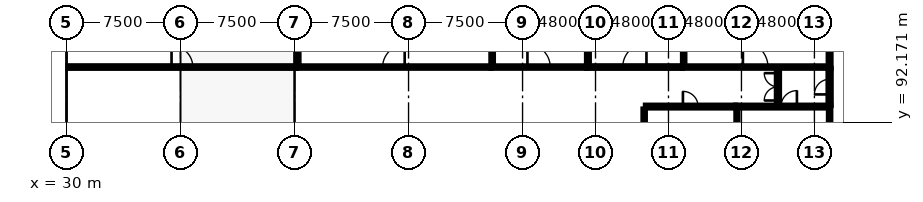
"""IFC4 building model, lengths in metres.
Left out: names, types, materials, properties, quantities, classifications, styles, units other than length and angle.
Written with IfcOpenShell. Run it as: python <this file> out.ifc"""

import sys

from ifc_helpers import new_model, si_unit, direction, frame, frame_2d, origin, place, context, subcontext, project, spatial, rectangle, extrude, element, fill, save


model = new_model("IFC4")
c1 = context("Model", 3, precision=1e-05, world=origin(), true_north=direction((0.0, 1.0)))
c2 = subcontext(c1, "Body", "Model", "MODEL_VIEW")
j1 = project(units=[si_unit("LENGTHUNIT", "METRE"), si_unit("PLANEANGLEUNIT", "RADIAN")], contexts=[c1])
p1 = place(None, origin())
s1 = spatial("IfcSite", under=j1, at=p1, CompositionType="ELEMENT")
p2 = place(p1, origin())
s2 = spatial("IfcBuilding", under=s1, at=p2, CompositionType="ELEMENT")
p3 = place(p2, origin())
s3 = spatial("IfcBuildingStorey", under=s2, at=p3, CompositionType="ELEMENT", Elevation=0.0)
p4 = place(p3, frame((76.8, 93.285, 0.0), z_axis=(0.0, 0.0, 1.0), x_axis=(0.0, 1.0, 0.0)))
e1 = element("IfcWall", 1, at=p4, inside=s3, PredefinedType="PARTITIONING", context=c2, shape_type="SweptSolid", body=[
    extrude(rectangle(XDim=2.43, YDim=0.2, at=frame_2d((1.215, 0.0))), origin(), (0.0, 0.0, 1.0), 4.7),
])
p5 = place(p4, frame((0.315, 0.0, 0.0)))
e2 = element("IfcOpeningElement", 2, at=p5, cuts=e1, PredefinedType="OPENING", context=c2, shape_type="SweptSolid", body=[
    extrude(rectangle(XDim=1.8, YDim=2.15, at=frame_2d((0.9, 1.075))), frame((0.0, 0.112, 0.0), z_axis=(0.0, -1.0, 0.0), x_axis=(1.0, 0.0, 0.0)), (0.0, 0.0, 1.0), 0.224),
])
p6 = place(p3, frame((30.102, 95.8, 0.0), z_axis=(0.0, 0.0, 1.0), x_axis=(1.0, 0.0, 0.0)))
e3 = element("IfcWall", 3, at=p6, inside=s3, PredefinedType="PARTITIONING", context=c2, shape_type="SweptSolid", body=[
    extrude(rectangle(XDim=15.013, YDim=0.16, at=frame_2d((7.506, 0.0))), origin(), (0.0, 0.0, 1.0), 4.035),
])
p7 = place(p6, frame((6.806, 0.0, 0.0)))
e4 = element("IfcOpeningElement", 4, at=p7, cuts=e3, PredefinedType="OPENING", context=c2, shape_type="SweptSolid", body=[
    extrude(rectangle(XDim=1.4, YDim=2.25, at=frame_2d((0.7, 1.125))), frame((0.0, 0.092, 0.0), z_axis=(0.0, -1.0, 0.0), x_axis=(1.0, 0.0, 0.0)), (0.0, 0.0, 1.0), 0.184),
])
p8 = place(p3, frame((45.127, 95.8, 0.0), z_axis=(0.0, 0.0, 1.0), x_axis=(1.0, 0.0, 0.0)))
e5 = element("IfcWall", 5, at=p8, inside=s3, PredefinedType="PARTITIONING", context=c2, shape_type="SweptSolid", body=[
    extrude(rectangle(XDim=12.788, YDim=0.15, at=frame_2d((6.394, 0.0))), origin(), (0.0, 0.0, 1.0), 3.985),
])
p9 = place(p8, frame((5.669, 0.0, 0.0)))
e6 = element("IfcOpeningElement", 6, at=p9, cuts=e5, PredefinedType="OPENING", context=c2, shape_type="SweptSolid", body=[
    extrude(rectangle(XDim=1.45, YDim=2.26, at=frame_2d((0.725, 1.13))), frame((0.0, 0.087, 0.0), z_axis=(0.0, -1.0, 0.0), x_axis=(1.0, 0.0, 0.0)), (0.0, 0.0, 1.0), 0.174),
])
p10 = place(p3, frame((57.927, 95.8, 0.0), z_axis=(0.0, 0.0, 1.0), x_axis=(1.0, 0.0, 0.0)))
e7 = element("IfcWall", 7, at=p10, inside=s3, PredefinedType="PARTITIONING", context=c2, shape_type="SweptSolid", body=[
    extrude(rectangle(XDim=6.288, YDim=0.15, at=frame_2d((3.144, 0.0))), origin(), (0.0, 0.0, 1.0), 3.985),
])
p11 = place(p10, frame((2.394, 0.0, 0.0)))
e8 = element("IfcOpeningElement", 8, at=p11, cuts=e7, PredefinedType="OPENING", context=c2, shape_type="SweptSolid", body=[
    extrude(rectangle(XDim=1.5, YDim=2.28, at=frame_2d((0.75, 1.14))), frame((0.0, 0.087, 0.0), z_axis=(0.0, -1.0, 0.0), x_axis=(1.0, 0.0, 0.0)), (0.0, 0.0, 1.0), 0.174),
])
p12 = place(p3, frame((64.227, 95.8, 0.0), z_axis=(0.0, 0.0, 1.0), x_axis=(1.0, 0.0, 0.0)))
e9 = element("IfcWall", 9, at=p12, inside=s3, PredefinedType="PARTITIONING", context=c2, shape_type="SweptSolid", body=[
    extrude(rectangle(XDim=6.288, YDim=0.16, at=frame_2d((3.144, 0.0))), origin(), (0.0, 0.0, 1.0), 3.985),
])
p13 = place(p12, frame((2.364, 0.0, 0.0)))
e10 = element("IfcOpeningElement", 10, at=p13, cuts=e9, PredefinedType="OPENING", context=c2, shape_type="SweptSolid", body=[
    extrude(rectangle(XDim=1.56, YDim=2.3, at=frame_2d((0.78, 1.15))), frame((0.0, 0.092, 0.0), z_axis=(0.0, -1.0, 0.0), x_axis=(1.0, 0.0, 0.0)), (0.0, 0.0, 1.0), 0.184),
])
p14 = place(p3, frame((70.527, 95.8, 0.0), z_axis=(0.0, 0.0, 1.0), x_axis=(1.0, 0.0, 0.0)))
e11 = element("IfcWall", 11, at=p14, inside=s3, PredefinedType="PARTITIONING", context=c2, shape_type="SweptSolid", body=[
    extrude(rectangle(XDim=9.588, YDim=0.15, at=frame_2d((4.794, 0.0))), origin(), (0.0, 0.0, 1.0), 3.985),
])
p15 = place(p14, frame((3.969, 0.0, 0.0)))
e12 = element("IfcOpeningElement", 12, at=p15, cuts=e11, PredefinedType="OPENING", context=c2, shape_type="SweptSolid", body=[
    extrude(rectangle(XDim=1.65, YDim=2.32, at=frame_2d((0.825, 1.16))), frame((0.0, 0.087, 0.0), z_axis=(0.0, -1.0, 0.0), x_axis=(1.0, 0.0, 0.0)), (0.0, 0.0, 1.0), 0.174),
])
p16 = place(p3, frame((68.085, 93.2, 0.0), z_axis=(0.0, 0.0, 1.0), x_axis=(1.0, 0.0, 0.0)))
e13 = element("IfcWall", 13, at=p16, inside=s3, PredefinedType="PARTITIONING", context=c2, shape_type="SweptSolid", body=[
    extrude(rectangle(XDim=5.93, YDim=0.18, at=frame_2d((2.965, 0.0))), origin(), (0.0, 0.0, 1.0), 3.985),
])
p17 = place(p16, frame((2.465, 0.0, 0.0)))
e14 = element("IfcOpeningElement", 14, at=p17, cuts=e13, PredefinedType="OPENING", context=c2, shape_type="SweptSolid", body=[
    extrude(rectangle(XDim=1.0, YDim=2.15, at=frame_2d((0.5, 1.075))), frame((0.0, 0.102, 0.0), z_axis=(0.0, -1.0, 0.0), x_axis=(1.0, 0.0, 0.0)), (0.0, 0.0, 1.0), 0.204),
])
p18 = place(p3, frame((74.027, 93.2, 0.0), z_axis=(0.0, 0.0, 1.0), x_axis=(1.0, 0.0, 0.0)))
e15 = element("IfcWall", 15, at=p18, inside=s3, PredefinedType="PARTITIONING", context=c2, shape_type="SweptSolid", body=[
    extrude(rectangle(XDim=6.088, YDim=0.18, at=frame_2d((3.044, 0.0))), origin(), (0.0, 0.0, 1.0), 3.985),
])
p19 = place(p18, frame((2.972, 0.0, 0.0)))
e16 = element("IfcOpeningElement", 16, at=p19, cuts=e15, PredefinedType="OPENING", context=c2, shape_type="SweptSolid", body=[
    extrude(rectangle(XDim=1.05, YDim=2.15, at=frame_2d((0.525, 1.075))), frame((0.0, 0.102, 0.0), z_axis=(0.0, -1.0, 0.0), x_axis=(1.0, 0.0, 0.0)), (0.0, 0.0, 1.0), 0.204),
])
p20 = place(p3, frame((80.2, 93.285, 0.0), z_axis=(0.0, 0.0, 1.0), x_axis=(0.0, 1.0, 0.0)))
e17 = element("IfcWall", 17, at=p20, inside=s3, PredefinedType="PARTITIONING", context=c2, shape_type="SweptSolid", body=[
    extrude(rectangle(XDim=2.43, YDim=0.2, at=frame_2d((1.215, 0.0))), origin(), (0.0, 0.0, 1.0), 4.7),
])
p21 = place(p20, frame((0.715, 0.0, 0.0)))
e18 = element("IfcOpeningElement", 18, at=p21, cuts=e17, PredefinedType="OPENING", context=c2, shape_type="SweptSolid", body=[
    extrude(rectangle(XDim=1.0, YDim=2.15, at=frame_2d((0.5, 1.075))), frame((0.0, 0.112, 0.0), z_axis=(0.0, -1.0, 0.0), x_axis=(1.0, 0.0, 0.0)), (0.0, 0.0, 1.0), 0.224),
])
p22 = place(p3, frame((45.2, 95.887, 0.0), z_axis=(0.0, 0.0, 1.0), x_axis=(0.0, 1.0, 0.0)))
e19 = element("IfcWall", 19, at=p22, inside=s3, PredefinedType="PARTITIONING", context=c2, shape_type="SweptSolid", body=[
    extrude(rectangle(XDim=17.126, YDim=0.18, at=frame_2d((8.563, 0.0))), origin(), (0.0, 0.0, 1.0), 3.985),
])
p23 = place(p3, frame((58.0, 95.887, 0.0), z_axis=(0.0, 0.0, 1.0), x_axis=(0.0, 1.0, 0.0)))
e20 = element("IfcWall", 20, at=p23, inside=s3, PredefinedType="PARTITIONING", context=c2, shape_type="SweptSolid", body=[
    extrude(rectangle(XDim=17.311, YDim=0.16, at=frame_2d((8.656, 0.0))), origin(), (0.0, 0.0, 1.0), 3.985),
])
p24 = place(p3, frame((64.3, 95.892, 0.0), z_axis=(0.0, 0.0, 1.0), x_axis=(0.0, 1.0, 0.0)))
e21 = element("IfcWall", 21, at=p24, inside=s3, PredefinedType="PARTITIONING", context=c2, shape_type="SweptSolid", body=[
    extrude(rectangle(XDim=17.206, YDim=0.18, at=frame_2d((8.603, 0.0))), origin(), (0.0, 0.0, 1.0), 4.035),
])
p25 = place(p3, frame((70.6, 95.887, 0.0), z_axis=(0.0, 0.0, 1.0), x_axis=(0.0, 1.0, 0.0)))
e22 = element("IfcWall", 22, at=p25, inside=s3, PredefinedType="PARTITIONING", context=c2, shape_type="SweptSolid", body=[
    extrude(rectangle(XDim=17.211, YDim=0.15, at=frame_2d((8.605, 0.0))), origin(), (0.0, 0.0, 1.0), 4.035),
])
p26 = place(p3, frame((80.2, 95.727, 0.0), z_axis=(0.0, 0.0, 1.0), x_axis=(0.0, 1.0, 0.0)))
e23 = element("IfcWall", 23, at=p26, inside=s3, PredefinedType="PARTITIONING", context=c2, shape_type="SweptSolid", body=[
    extrude(rectangle(XDim=17.371, YDim=0.18, at=frame_2d((8.686, 0.0))), origin(), (0.0, 0.0, 1.0), 4.035),
])
p27 = place(p3, frame((68.0, 83.665, 0.0), z_axis=(0.0, 0.0, 1.0), x_axis=(0.0, 1.0, 0.0)))
e24 = element("IfcWall", 24, at=p27, inside=s3, PredefinedType="PARTITIONING", context=c2, shape_type="SweptSolid", body=[
    extrude(rectangle(XDim=9.37, YDim=0.15, at=frame_2d((4.685, 0.0))), origin(), (0.0, 0.0, 1.0), 4.035),
])
p28 = place(p3, frame((74.1, 83.637, 0.0), z_axis=(0.0, 0.0, 1.0), x_axis=(0.0, 1.0, 0.0)))
e25 = element("IfcWall", 25, at=p28, inside=s3, PredefinedType="PARTITIONING", context=c2, shape_type="SweptSolid", body=[
    extrude(rectangle(XDim=9.461, YDim=0.125, at=frame_2d((4.73, 0.0))), origin(), (0.0, 0.0, 1.0), 3.985),
])
p29 = place(p3, frame((80.2, 83.665, 0.0), z_axis=(0.0, 0.0, 1.0), x_axis=(0.0, 1.0, 0.0)))
e26 = element("IfcWall", 26, at=p29, inside=s3, PredefinedType="PARTITIONING", context=c2, shape_type="SweptSolid", body=[
    extrude(rectangle(XDim=9.608, YDim=0.15, at=frame_2d((4.804, 0.0))), origin(), (0.0, 0.0, 1.0), 4.035),
])
p30 = place(p5, origin())
e27 = element("IfcDoor", 27, at=p30, inside=s3, OperationType="DOUBLE_DOOR_SINGLE_SWING", PredefinedType="DOOR", context=c2, shape_type="SweptSolid", body=[
    extrude(rectangle(XDim=1.8, YDim=2.15, at=frame_2d((0.9, 1.075))), frame((0.0, 0.025, 0.0), z_axis=(0.0, -1.0, 0.0), x_axis=(1.0, 0.0, 0.0)), (0.0, 0.0, 1.0), 0.05),
])
fill(e2, e27)
p31 = place(p7, origin())
e28 = element("IfcDoor", 28, at=p31, inside=s3, OperationType="SINGLE_SWING_LEFT", PredefinedType="DOOR", context=c2, shape_type="SweptSolid", body=[
    extrude(rectangle(XDim=1.4, YDim=2.25, at=frame_2d((0.7, 1.125))), frame((0.0, 0.025, 0.0), z_axis=(0.0, -1.0, 0.0), x_axis=(1.0, 0.0, 0.0)), (0.0, 0.0, 1.0), 0.05),
])
fill(e4, e28)
p32 = place(p9, origin())
e29 = element("IfcDoor", 29, at=p32, inside=s3, OperationType="SINGLE_SWING_RIGHT", PredefinedType="DOOR", context=c2, shape_type="SweptSolid", body=[
    extrude(rectangle(XDim=1.45, YDim=2.26, at=frame_2d((0.725, 1.13))), frame((0.0, 0.025, 0.0), z_axis=(0.0, -1.0, 0.0), x_axis=(1.0, 0.0, 0.0)), (0.0, 0.0, 1.0), 0.05),
])
fill(e6, e29)
p33 = place(p11, origin())
e30 = element("IfcDoor", 30, at=p33, inside=s3, OperationType="SINGLE_SWING_LEFT", PredefinedType="DOOR", context=c2, shape_type="SweptSolid", body=[
    extrude(rectangle(XDim=1.5, YDim=2.28, at=frame_2d((0.75, 1.14))), frame((0.0, 0.025, 0.0), z_axis=(0.0, -1.0, 0.0), x_axis=(1.0, 0.0, 0.0)), (0.0, 0.0, 1.0), 0.05),
])
fill(e8, e30)
p34 = place(p13, origin())
e31 = element("IfcDoor", 31, at=p34, inside=s3, OperationType="SINGLE_SWING_RIGHT", PredefinedType="DOOR", context=c2, shape_type="SweptSolid", body=[
    extrude(rectangle(XDim=1.56, YDim=2.3, at=frame_2d((0.78, 1.15))), frame((0.0, 0.025, 0.0), z_axis=(0.0, -1.0, 0.0), x_axis=(1.0, 0.0, 0.0)), (0.0, 0.0, 1.0), 0.05),
])
fill(e10, e31)
p35 = place(p15, origin())
e32 = element("IfcDoor", 32, at=p35, inside=s3, OperationType="SINGLE_SWING_LEFT", PredefinedType="DOOR", context=c2, shape_type="SweptSolid", body=[
    extrude(rectangle(XDim=1.65, YDim=2.32, at=frame_2d((0.825, 1.16))), frame((0.0, 0.025, 0.0), z_axis=(0.0, -1.0, 0.0), x_axis=(1.0, 0.0, 0.0)), (0.0, 0.0, 1.0), 0.05),
])
fill(e12, e32)
p36 = place(p17, origin())
e33 = element("IfcDoor", 33, at=p36, inside=s3, OperationType="SINGLE_SWING_LEFT", PredefinedType="DOOR", context=c2, shape_type="SweptSolid", body=[
    extrude(rectangle(XDim=1.0, YDim=2.15, at=frame_2d((0.5, 1.075))), frame((0.0, 0.025, 0.0), z_axis=(0.0, -1.0, 0.0), x_axis=(1.0, 0.0, 0.0)), (0.0, 0.0, 1.0), 0.05),
])
fill(e14, e33)
p37 = place(p19, origin())
e34 = element("IfcDoor", 34, at=p37, inside=s3, OperationType="SINGLE_SWING_RIGHT", PredefinedType="DOOR", context=c2, shape_type="SweptSolid", body=[
    extrude(rectangle(XDim=1.05, YDim=2.15, at=frame_2d((0.525, 1.075))), frame((0.0, 0.025, 0.0), z_axis=(0.0, -1.0, 0.0), x_axis=(1.0, 0.0, 0.0)), (0.0, 0.0, 1.0), 0.05),
])
fill(e16, e34)
p38 = place(p21, origin())
e35 = element("IfcDoor", 35, at=p38, inside=s3, OperationType="SINGLE_SWING_LEFT", PredefinedType="DOOR", context=c2, shape_type="SweptSolid", body=[
    extrude(rectangle(XDim=1.0, YDim=2.15, at=frame_2d((0.5, 1.075))), frame((0.0, 0.025, 0.0), z_axis=(0.0, -1.0, 0.0), x_axis=(1.0, 0.0, 0.0)), (0.0, 0.0, 1.0), 0.05),
])
fill(e18, e35)
save(model, sys.argv[1])
